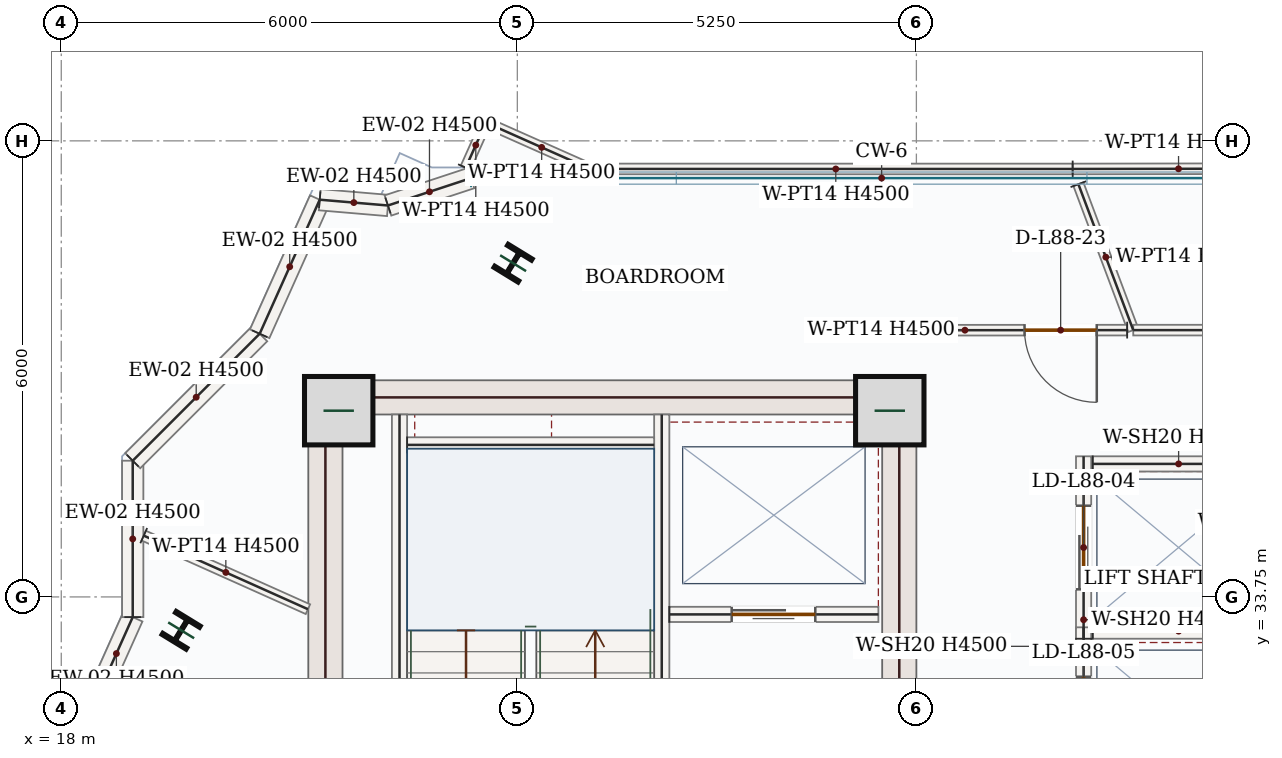
"""IFC4 building model, lengths in metres.
Left out: names, types, materials, properties, quantities, classifications, styles, units other than length and angle.
Written with IfcOpenShell. Run it as: python <this file> out.ifc"""

import sys

from ifc_helpers import new_model, si_unit, direction, frame, frame_2d, origin, origin_2d, place, context, subcontext, project, spatial, rectangle, i_section, extrude, source, transform, mapped, element, fill, save


model = new_model("IFC4")
c1 = context("Model", 3, precision=1e-05, world=origin(), true_north=direction((0.0, 1.0)))
c2 = subcontext(c1, "Body", "Model", "MODEL_VIEW")
j1 = project(units=[si_unit("LENGTHUNIT", "METRE"), si_unit("PLANEANGLEUNIT", "RADIAN")], contexts=[c1])
p1 = place(None, origin())
s1 = spatial("IfcSite", under=j1, at=p1, CompositionType="ELEMENT")
p2 = place(p1, origin())
s2 = spatial("IfcBuilding", under=s1, at=p2, CompositionType="ELEMENT")
p3 = place(p2, frame((0.0, 0.0, 361.05)))
s3 = spatial("IfcBuildingStorey", under=s2, at=p3, CompositionType="ELEMENT", Elevation=361.05)
m1 = source(origin(), c2, "Body", "SweptSolid", [
    extrude(rectangle(XDim=8.55, YDim=0.45, at=frame_2d((4.275, 0.0))), origin(), (0.0, 0.0, 1.0), 4.5),
])
p4 = place(p3, frame((21.475, 28.05, 0.0), z_axis=(0.0, 0.0, 1.0), x_axis=(0.0, 1.0, 0.0)))
e1 = element("IfcWall", 1, at=p4, inside=s3, PredefinedType="SHEAR", context=c2, shape_type="MappedRepresentation", body=[
    mapped(m1, transform((0.0, 0.0, 0.0), x_axis=(1.0, 0.0, 0.0), y_axis=(0.0, 1.0, 0.0), z_axis=(0.0, 0.0, 1.0), scale=1.0)),
])
p5 = place(p3, frame((29.025, 28.05, 0.0), z_axis=(0.0, 0.0, 1.0), x_axis=(0.0, 1.0, 0.0)))
e2 = element("IfcWall", 2, at=p5, inside=s3, PredefinedType="SHEAR", context=c2, shape_type="SweptSolid", body=[
    extrude(rectangle(XDim=8.55, YDim=0.45, at=frame_2d((4.275, 0.0))), origin(), (0.0, 0.0, 1.0), 4.5),
])
p6 = place(p5, frame((1.5, 0.0, 0.0)))
e3 = element("IfcOpeningElement", 3, at=p6, cuts=e2, PredefinedType="OPENING", context=c2, shape_type="SweptSolid", body=[
    extrude(rectangle(XDim=1.1, YDim=2.2, at=frame_2d((0.55, 1.1))), frame((0.0, 0.235, 0.0), z_axis=(0.0, -1.0, 0.0), x_axis=(1.0, 0.0, 0.0)), (0.0, 0.0, 1.0), 0.47),
])
m2 = source(origin(), c2, "Body", "SweptSolid", [
    extrude(rectangle(XDim=7.1, YDim=0.45, at=frame_2d((3.55, 0.0))), origin(), (0.0, 0.0, 1.0), 4.5),
])
p7 = place(p3, frame((21.7, 36.375, 0.0), z_axis=(0.0, 0.0, 1.0), x_axis=(1.0, 0.0, 0.0)))
e4 = element("IfcWall", 4, at=p7, inside=s3, PredefinedType="SHEAR", context=c2, shape_type="MappedRepresentation", body=[
    mapped(m2, transform((0.0, 0.0, 0.0), x_axis=(1.0, 0.0, 0.0), y_axis=(0.0, 1.0, 0.0), z_axis=(0.0, 0.0, 1.0), scale=1.0)),
])
m3 = source(origin(), c2, "Body", "SweptSolid", [
    extrude(rectangle(XDim=0.9, YDim=0.9, at=origin_2d()), origin(), (0.0, 0.0, 1.0), 4.8),
])
for number, where, z_axis, x_axis in (
    (5, (21.65, 36.2, 0.0), (0.0, 0.0, 1.0), (1.0, 0.0, 0.0)),
    (6, (28.9, 36.2, 0.0), (0.0, 0.0, 1.0), (1.0, 0.0, 0.0)),
):
    element("IfcColumn", number, at=place(p3, frame(where, z_axis=z_axis, x_axis=x_axis)), inside=s3, PredefinedType="COLUMN", context=c2, shape_type="MappedRepresentation", body=[
        mapped(m3, transform((0.0, 0.0, 0.0), x_axis=(1.0, 0.0, 0.0), y_axis=(0.0, 1.0, 0.0), z_axis=(0.0, 0.0, 1.0), scale=1.0)),
    ])
m4 = source(origin(), c2, "Body", "SweptSolid", [
    extrude(i_section(OverallWidth=0.369, OverallDepth=0.356, WebThickness=0.011, FlangeThickness=0.018, FilletRadius=0.018, at=origin_2d()), origin(), (0.0, 0.0, 1.0), 4.8),
])
for number, where, z_axis, x_axis in (
    (7, (23.945, 38.141, 0.0), (0.0, 0.0, 1.0), (-0.853, 0.522, 0.0)),
    (8, (19.577, 33.311, 0.0), (0.0, 0.0, 1.0), (-0.853, 0.522, 0.0)),
):
    element("IfcColumn", number, at=place(p3, frame(where, z_axis=z_axis, x_axis=x_axis)), inside=s3, PredefinedType="COLUMN", context=c2, shape_type="MappedRepresentation", body=[
        mapped(m4, transform((0.0, 0.0, 0.0), x_axis=(1.0, 0.0, 0.0), y_axis=(0.0, 1.0, 0.0), z_axis=(0.0, 0.0, 1.0), scale=1.0)),
    ])
p8 = place(p3, frame((17.344, 29.923, 0.0), z_axis=(0.0, 0.0, 1.0), x_axis=(0.408847516138, 0.912602711232, 0.0)))
e9 = element("IfcWall", 9, at=p8, inside=s3, PredefinedType="SOLIDWALL", context=c2, shape_type="SweptSolid", body=[
    extrude(rectangle(XDim=3.902, YDim=0.28, at=frame_2d((1.951, 0.0))), origin(), (0.0, 0.0, 1.0), 4.5),
])
p9 = place(p8, frame((1.201, 0.0, 0.85)))
e10 = element("IfcOpeningElement", 10, at=p9, cuts=e9, PredefinedType="OPENING", context=c2, shape_type="SweptSolid", body=[
    extrude(rectangle(XDim=1.5, YDim=1.5, at=frame_2d((0.75, 0.75))), frame((0.0, 0.15, 0.0), z_axis=(0.0, -1.0, 0.0), x_axis=(1.0, 0.0, 0.0)), (0.0, 0.0, 1.0), 0.3),
])
m5 = source(origin(), c2, "Body", "SweptSolid", [
    extrude(rectangle(XDim=2.058, YDim=0.28, at=frame_2d((1.029, 0.0))), origin(), (0.0, 0.0, 1.0), 4.5),
])
p10 = place(p3, frame((18.94, 33.484, 0.0), z_axis=(0.0, 0.0, 1.0), x_axis=(0.0, 1.0, 0.0)))
e11 = element("IfcWall", 11, at=p10, inside=s3, PredefinedType="SOLIDWALL", context=c2, shape_type="MappedRepresentation", body=[
    mapped(m5, transform((0.0, 0.0, 0.0), x_axis=(1.0, 0.0, 0.0), y_axis=(0.0, 1.0, 0.0), z_axis=(0.0, 0.0, 1.0), scale=1.0)),
])
m6 = source(origin(), c2, "Body", "SweptSolid", [
    extrude(rectangle(XDim=2.362, YDim=0.28, at=frame_2d((1.181, 0.0))), origin(), (0.0, 0.0, 1.0), 4.5),
])
p11 = place(p3, frame((18.94, 35.542, 0.0), z_axis=(0.0, 0.0, 1.0), x_axis=(0.707106781187, 0.707106781187, 0.0)))
e12 = element("IfcWall", 12, at=p11, inside=s3, PredefinedType="SOLIDWALL", context=c2, shape_type="MappedRepresentation", body=[
    mapped(m6, transform((0.0, 0.0, 0.0), x_axis=(1.0, 0.0, 0.0), y_axis=(0.0, 1.0, 0.0), z_axis=(0.0, 0.0, 1.0), scale=1.0)),
])
m7 = source(origin(), c2, "Body", "SweptSolid", [
    extrude(rectangle(XDim=1.932, YDim=0.28, at=frame_2d((0.966, 0.0))), origin(), (0.0, 0.0, 1.0), 4.5),
])
p12 = place(p3, frame((20.61, 37.212, 0.0), z_axis=(0.0, 0.0, 1.0), x_axis=(0.408856367363, 0.912598745817, 0.0)))
e13 = element("IfcWall", 13, at=p12, inside=s3, PredefinedType="SOLIDWALL", context=c2, shape_type="MappedRepresentation", body=[
    mapped(m7, transform((0.0, 0.0, 0.0), x_axis=(1.0, 0.0, 0.0), y_axis=(0.0, 1.0, 0.0), z_axis=(0.0, 0.0, 1.0), scale=1.0)),
])
m8 = source(origin(), c2, "Body", "SweptSolid", [
    extrude(rectangle(XDim=0.9, YDim=0.28, at=frame_2d((0.45, 0.0))), origin(), (0.0, 0.0, 1.0), 4.5),
])
p13 = place(p3, frame((21.4, 38.976, 0.0), z_axis=(0.0, 0.0, 1.0), x_axis=(0.996415533388, -0.084593645284, 0.0)))
e14 = element("IfcWall", 14, at=p13, inside=s3, PredefinedType="SOLIDWALL", context=c2, shape_type="MappedRepresentation", body=[
    mapped(m8, transform((0.0, 0.0, 0.0), x_axis=(1.0, 0.0, 0.0), y_axis=(0.0, 1.0, 0.0), z_axis=(0.0, 0.0, 1.0), scale=1.0)),
])
m9 = source(origin(), c2, "Body", "SweptSolid", [
    extrude(rectangle(XDim=1.151, YDim=0.28, at=frame_2d((0.575, 0.0))), origin(), (0.0, 0.0, 1.0), 4.5),
])
p14 = place(p3, frame((22.298, 38.9, 0.0), z_axis=(0.0, 0.0, 1.0), x_axis=(0.949717622695, 0.313107708532, 0.0)))
e15 = element("IfcWall", 15, at=p14, inside=s3, PredefinedType="SOLIDWALL", context=c2, shape_type="MappedRepresentation", body=[
    mapped(m9, transform((0.0, 0.0, 0.0), x_axis=(1.0, 0.0, 0.0), y_axis=(0.0, 1.0, 0.0), z_axis=(0.0, 0.0, 1.0), scale=1.0)),
])
m10 = source(origin(), c2, "Body", "SweptSolid", [
    extrude(rectangle(XDim=7.87, YDim=0.2, at=frame_2d((3.935, 0.0))), origin(), (0.0, 0.0, 1.0), 4.5),
])
p15 = place(p3, frame((22.45, 28.28, 0.0), z_axis=(0.0, 0.0, 1.0), x_axis=(0.0, 1.0, 0.0)))
e16 = element("IfcWall", 16, at=p15, inside=s3, PredefinedType="SOLIDWALL", context=c2, shape_type="MappedRepresentation", body=[
    mapped(m10, transform((0.0, 0.0, 0.0), x_axis=(1.0, 0.0, 0.0), y_axis=(0.0, 1.0, 0.0), z_axis=(0.0, 0.0, 1.0), scale=1.0)),
])
p16 = place(p3, frame((25.9, 28.15, 0.0), z_axis=(0.0, 0.0, 1.0), x_axis=(0.0, 1.0, 0.0)))
e17 = element("IfcWall", 17, at=p16, inside=s3, PredefinedType="SOLIDWALL", context=c2, shape_type="SweptSolid", body=[
    extrude(rectangle(XDim=8.0, YDim=0.2, at=frame_2d((4.0, 0.0))), origin(), (0.0, 0.0, 1.0), 4.5),
])
p17 = place(p16, frame((0.4, 0.0, 0.0)))
e18 = element("IfcOpeningElement", 18, at=p17, cuts=e17, PredefinedType="OPENING", context=c2, shape_type="SweptSolid", body=[
    extrude(rectangle(XDim=1.05, YDim=2.15, at=frame_2d((0.525, 1.075))), frame((0.0, 0.11, 0.0), z_axis=(0.0, -1.0, 0.0), x_axis=(1.0, 0.0, 0.0)), (0.0, 0.0, 1.0), 0.22),
])
m11 = source(origin(), c2, "Body", "SweptSolid", [
    extrude(rectangle(XDim=3.25, YDim=0.2, at=frame_2d((1.625, 0.0))), origin(), (0.0, 0.0, 1.0), 4.5),
])
p18 = place(p3, frame((22.55, 35.75, 0.0), z_axis=(0.0, 0.0, 1.0), x_axis=(1.0, 0.0, 0.0)))
e19 = element("IfcWall", 19, at=p18, inside=s3, PredefinedType="SOLIDWALL", context=c2, shape_type="MappedRepresentation", body=[
    mapped(m11, transform((0.0, 0.0, 0.0), x_axis=(1.0, 0.0, 0.0), y_axis=(0.0, 1.0, 0.0), z_axis=(0.0, 0.0, 1.0), scale=1.0)),
])
p19 = place(p3, frame((26.0, 33.52, 0.0), z_axis=(0.0, 0.0, 1.0), x_axis=(1.0, 0.0, 0.0)))
e20 = element("IfcWall", 20, at=p19, inside=s3, PredefinedType="SOLIDWALL", context=c2, shape_type="SweptSolid", body=[
    extrude(rectangle(XDim=2.75, YDim=0.2, at=frame_2d((1.375, 0.0))), origin(), (0.0, 0.0, 1.0), 4.5),
])
p20 = place(p19, frame((0.82, 0.0, 0.0)))
e21 = element("IfcOpeningElement", 21, at=p20, cuts=e20, PredefinedType="OPENING", context=c2, shape_type="SweptSolid", body=[
    extrude(rectangle(XDim=1.1, YDim=2.15, at=frame_2d((0.55, 1.075))), frame((0.0, 0.11, 0.0), z_axis=(0.0, -1.0, 0.0), x_axis=(1.0, 0.0, 0.0)), (0.0, 0.0, 1.0), 0.22),
])
p21 = place(p3, frame((31.45, 33.2, 0.0), z_axis=(0.0, 0.0, 1.0), x_axis=(0.0, 1.0, 0.0)))
e22 = element("IfcWall", 22, at=p21, inside=s3, PredefinedType="SOLIDWALL", context=c2, shape_type="SweptSolid", body=[
    extrude(rectangle(XDim=2.4, YDim=0.2, at=frame_2d((1.2, 0.0))), origin(), (0.0, 0.0, 1.0), 4.5),
])
p22 = place(p21, frame((0.65, 0.0, 0.0)))
e23 = element("IfcOpeningElement", 23, at=p22, cuts=e22, PredefinedType="OPENING", context=c2, shape_type="SweptSolid", body=[
    extrude(rectangle(XDim=1.1, YDim=2.15, at=frame_2d((0.55, 1.075))), frame((0.0, 0.11, 0.0), z_axis=(0.0, -1.0, 0.0), x_axis=(1.0, 0.0, 0.0)), (0.0, 0.0, 1.0), 0.22),
])
m12 = source(origin(), c2, "Body", "SweptSolid", [
    extrude(rectangle(XDim=2.26, YDim=0.2, at=frame_2d((1.13, 0.0))), origin(), (0.0, 0.0, 1.0), 4.5),
])
for number, where, z_axis, x_axis in (
    (24, (31.57, 33.3, 0.0), (0.0, 0.0, 1.0), (1.0, 0.0, 0.0)),
    (25, (31.57, 35.5, 0.0), (0.0, 0.0, 1.0), (1.0, 0.0, 0.0)),
):
    element("IfcWall", number, at=place(p3, frame(where, z_axis=z_axis, x_axis=x_axis)), inside=s3, PredefinedType="SOLIDWALL", context=c2, shape_type="MappedRepresentation", body=[
        mapped(m12, transform((0.0, 0.0, 0.0), x_axis=(1.0, 0.0, 0.0), y_axis=(0.0, 1.0, 0.0), z_axis=(0.0, 0.0, 1.0), scale=1.0)),
    ])
p23 = place(p3, frame((31.45, 30.95, 0.0), z_axis=(0.0, 0.0, 1.0), x_axis=(0.0, 1.0, 0.0)))
e26 = element("IfcWall", 26, at=p23, inside=s3, PredefinedType="SOLIDWALL", context=c2, shape_type="SweptSolid", body=[
    extrude(rectangle(XDim=2.4, YDim=0.2, at=frame_2d((1.2, 0.0))), origin(), (0.0, 0.0, 1.0), 4.5),
])
p24 = place(p23, frame((0.65, 0.0, 0.0)))
e27 = element("IfcOpeningElement", 27, at=p24, cuts=e26, PredefinedType="OPENING", context=c2, shape_type="SweptSolid", body=[
    extrude(rectangle(XDim=1.1, YDim=2.15, at=frame_2d((0.55, 1.075))), frame((0.0, 0.11, 0.0), z_axis=(0.0, -1.0, 0.0), x_axis=(1.0, 0.0, 0.0)), (0.0, 0.0, 1.0), 0.22),
])
m13 = source(origin(), c2, "Body", "SweptSolid", [
    extrude(rectangle(XDim=2.367, YDim=0.14, at=frame_2d((1.184, 0.0))), origin(), (0.0, 0.0, 1.0), 4.5),
])
p25 = place(p3, frame((19.085, 34.556, 0.0), z_axis=(0.0, 0.0, 1.0), x_axis=(0.912599576991, -0.408854512115, 0.0)))
e28 = element("IfcWall", 28, at=p25, inside=s3, PredefinedType="PARTITIONING", context=c2, shape_type="MappedRepresentation", body=[
    mapped(m13, transform((0.0, 0.0, 0.0), x_axis=(1.0, 0.0, 0.0), y_axis=(0.0, 1.0, 0.0), z_axis=(0.0, 0.0, 1.0), scale=1.0)),
])
m14 = source(origin(), c2, "Body", "SweptSolid", [
    extrude(rectangle(XDim=2.051, YDim=0.14, at=frame_2d((1.025, 0.0))), origin(), (0.0, 0.0, 1.0), 4.5),
])
p26 = place(p3, frame((31.382, 39.18, 0.0), z_axis=(0.0, 0.0, 1.0), x_axis=(0.35174952174, -0.936094158702, 0.0)))
e29 = element("IfcWall", 29, at=p26, inside=s3, PredefinedType="PARTITIONING", context=c2, shape_type="MappedRepresentation", body=[
    mapped(m14, transform((0.0, 0.0, 0.0), x_axis=(1.0, 0.0, 0.0), y_axis=(0.0, 1.0, 0.0), z_axis=(0.0, 0.0, 1.0), scale=1.0)),
])
p27 = place(p3, frame((32.023, 37.26, 0.0), z_axis=(0.0, 0.0, 1.0), x_axis=(-0.999999902762, -0.000440994842, 0.0)))
e30 = element("IfcWall", 30, at=p27, inside=s3, PredefinedType="PARTITIONING", context=c2, shape_type="SweptSolid", body=[
    extrude(rectangle(XDim=2.768, YDim=0.14, at=frame_2d((1.384, 0.0))), origin(), (0.0, 0.0, 1.0), 4.5),
])
p28 = place(p27, frame((0.4, 0.0, 0.0)))
e31 = element("IfcOpeningElement", 31, at=p28, cuts=e30, PredefinedType="OPENING", context=c2, shape_type="SweptSolid", body=[
    extrude(rectangle(XDim=0.95, YDim=2.15, at=frame_2d((0.475, 1.075))), frame((0.0, 0.08, 0.0), z_axis=(0.0, -1.0, 0.0), x_axis=(1.0, 0.0, 0.0)), (0.0, 0.0, 1.0), 0.16),
])
m15 = source(origin(), c2, "Body", "SweptSolid", [
    extrude(rectangle(XDim=0.65, YDim=0.14, at=frame_2d((0.325, 0.0))), origin(), (0.0, 0.0, 1.0), 4.5),
])
p29 = place(p3, frame((23.321, 39.397, 0.0), z_axis=(0.0, 0.0, 1.0), x_axis=(0.40881875169, 0.912615597208, 0.0)))
e32 = element("IfcWall", 32, at=p29, inside=s3, PredefinedType="PARTITIONING", context=c2, shape_type="MappedRepresentation", body=[
    mapped(m15, transform((0.0, 0.0, 0.0), x_axis=(1.0, 0.0, 0.0), y_axis=(0.0, 1.0, 0.0), z_axis=(0.0, 0.0, 1.0), scale=1.0)),
])
m16 = source(origin(), c2, "Body", "SweptSolid", [
    extrude(rectangle(XDim=1.606, YDim=0.14, at=frame_2d((0.803, 0.0))), origin(), (0.0, 0.0, 1.0), 4.5),
])
p30 = place(p3, frame((23.586, 39.991, 0.0), z_axis=(0.0, 0.0, 1.0), x_axis=(0.913673598799, -0.406448711227, 0.0)))
e33 = element("IfcWall", 33, at=p30, inside=s3, PredefinedType="PARTITIONING", context=c2, shape_type="MappedRepresentation", body=[
    mapped(m16, transform((0.0, 0.0, 0.0), x_axis=(1.0, 0.0, 0.0), y_axis=(0.0, 1.0, 0.0), z_axis=(0.0, 0.0, 1.0), scale=1.0)),
])
m17 = source(origin(), c2, "Body", "SweptSolid", [
    extrude(rectangle(XDim=6.234, YDim=0.14, at=frame_2d((3.117, 0.0))), origin(), (0.0, 0.0, 1.0), 4.5),
])
p31 = place(p3, frame((25.073, 39.38, 0.0), z_axis=(0.0, 0.0, 1.0), x_axis=(0.999999996932, -7.8330004e-05, 0.0)))
e34 = element("IfcWall", 34, at=p31, inside=s3, PredefinedType="PARTITIONING", context=c2, shape_type="MappedRepresentation", body=[
    mapped(m17, transform((0.0, 0.0, 0.0), x_axis=(1.0, 0.0, 0.0), y_axis=(0.0, 1.0, 0.0), z_axis=(0.0, 0.0, 1.0), scale=1.0)),
])
p32 = place(p3, frame((40.575, 37.26, 0.0), z_axis=(0.0, 0.0, 1.0), x_axis=(-1.0, 0.0, 0.0)))
e35 = element("IfcWall", 35, at=p32, inside=s3, PredefinedType="PARTITIONING", context=c2, shape_type="SweptSolid", body=[
    extrude(rectangle(XDim=8.472, YDim=0.14, at=frame_2d((4.236, 0.0))), origin(), (0.0, 0.0, 1.0), 4.5),
])
p33 = place(p32, frame((3.761, 0.0, 0.0)))
e36 = element("IfcOpeningElement", 36, at=p33, cuts=e35, PredefinedType="OPENING", context=c2, shape_type="SweptSolid", body=[
    extrude(rectangle(XDim=0.95, YDim=2.15, at=frame_2d((0.475, 1.075))), frame((0.0, 0.08, 0.0), z_axis=(0.0, -1.0, 0.0), x_axis=(1.0, 0.0, 0.0)), (0.0, 0.0, 1.0), 0.16),
])
m18 = source(origin(), c2, "Body", "SweptSolid", [
    extrude(rectangle(XDim=2.785, YDim=0.14, at=frame_2d((1.393, 0.0))), origin(), (0.0, 0.0, 1.0), 4.5),
])
p34 = place(p3, frame((31.306, 39.38, 0.0), z_axis=(0.0, 0.0, 1.0), x_axis=(0.999998755431, 0.001577699851, 0.0)))
e37 = element("IfcWall", 37, at=p34, inside=s3, PredefinedType="PARTITIONING", context=c2, shape_type="MappedRepresentation", body=[
    mapped(m18, transform((0.0, 0.0, 0.0), x_axis=(1.0, 0.0, 0.0), y_axis=(0.0, 1.0, 0.0), z_axis=(0.0, 0.0, 1.0), scale=1.0)),
])
m19 = source(origin(), c2, "Body", "SweptSolid", [
    extrude(rectangle(XDim=1.1, YDim=2.15, at=frame_2d((0.55, 1.075))), frame((0.0, 0.025, 0.0), z_axis=(0.0, -1.0, 0.0), x_axis=(1.0, 0.0, 0.0)), (0.0, 0.0, 1.0), 0.05),
])
p35 = place(p20, origin())
e38 = element("IfcDoor", 38, at=p35, inside=s3, OperationType="DOUBLE_DOOR_SLIDING", PredefinedType="DOOR", context=c2, shape_type="MappedRepresentation", body=[
    mapped(m19, transform((0.0, 0.0, 0.0), x_axis=(1.0, 0.0, 0.0), y_axis=(0.0, 1.0, 0.0), z_axis=(0.0, 0.0, 1.0), scale=1.0)),
])
fill(e21, e38)
p36 = place(p22, origin())
e39 = element("IfcDoor", 39, at=p36, inside=s3, OperationType="DOUBLE_DOOR_SLIDING", PredefinedType="DOOR", context=c2, shape_type="MappedRepresentation", body=[
    mapped(m19, transform((0.0, 0.0, 0.0), x_axis=(1.0, 0.0, 0.0), y_axis=(0.0, 1.0, 0.0), z_axis=(0.0, 0.0, 1.0), scale=1.0)),
])
fill(e23, e39)
p37 = place(p24, origin())
e40 = element("IfcDoor", 40, at=p37, inside=s3, OperationType="DOUBLE_DOOR_SLIDING", PredefinedType="DOOR", context=c2, shape_type="MappedRepresentation", body=[
    mapped(m19, transform((0.0, 0.0, 0.0), x_axis=(1.0, 0.0, 0.0), y_axis=(0.0, 1.0, 0.0), z_axis=(0.0, 0.0, 1.0), scale=1.0)),
])
fill(e27, e40)
m20 = source(origin(), c2, "Body", "SweptSolid", [
    extrude(rectangle(XDim=0.95, YDim=2.15, at=frame_2d((0.475, 1.075))), frame((0.0, 0.025, 0.0), z_axis=(0.0, -1.0, 0.0), x_axis=(1.0, 0.0, 0.0)), (0.0, 0.0, 1.0), 0.05),
])
p38 = place(p28, origin())
e41 = element("IfcDoor", 41, at=p38, inside=s3, OperationType="SINGLE_SWING_LEFT", PredefinedType="DOOR", context=c2, shape_type="MappedRepresentation", body=[
    mapped(m20, transform((0.0, 0.0, 0.0), x_axis=(1.0, 0.0, 0.0), y_axis=(0.0, 1.0, 0.0), z_axis=(0.0, 0.0, 1.0), scale=1.0)),
])
fill(e31, e41)
save(model, sys.argv[1])
